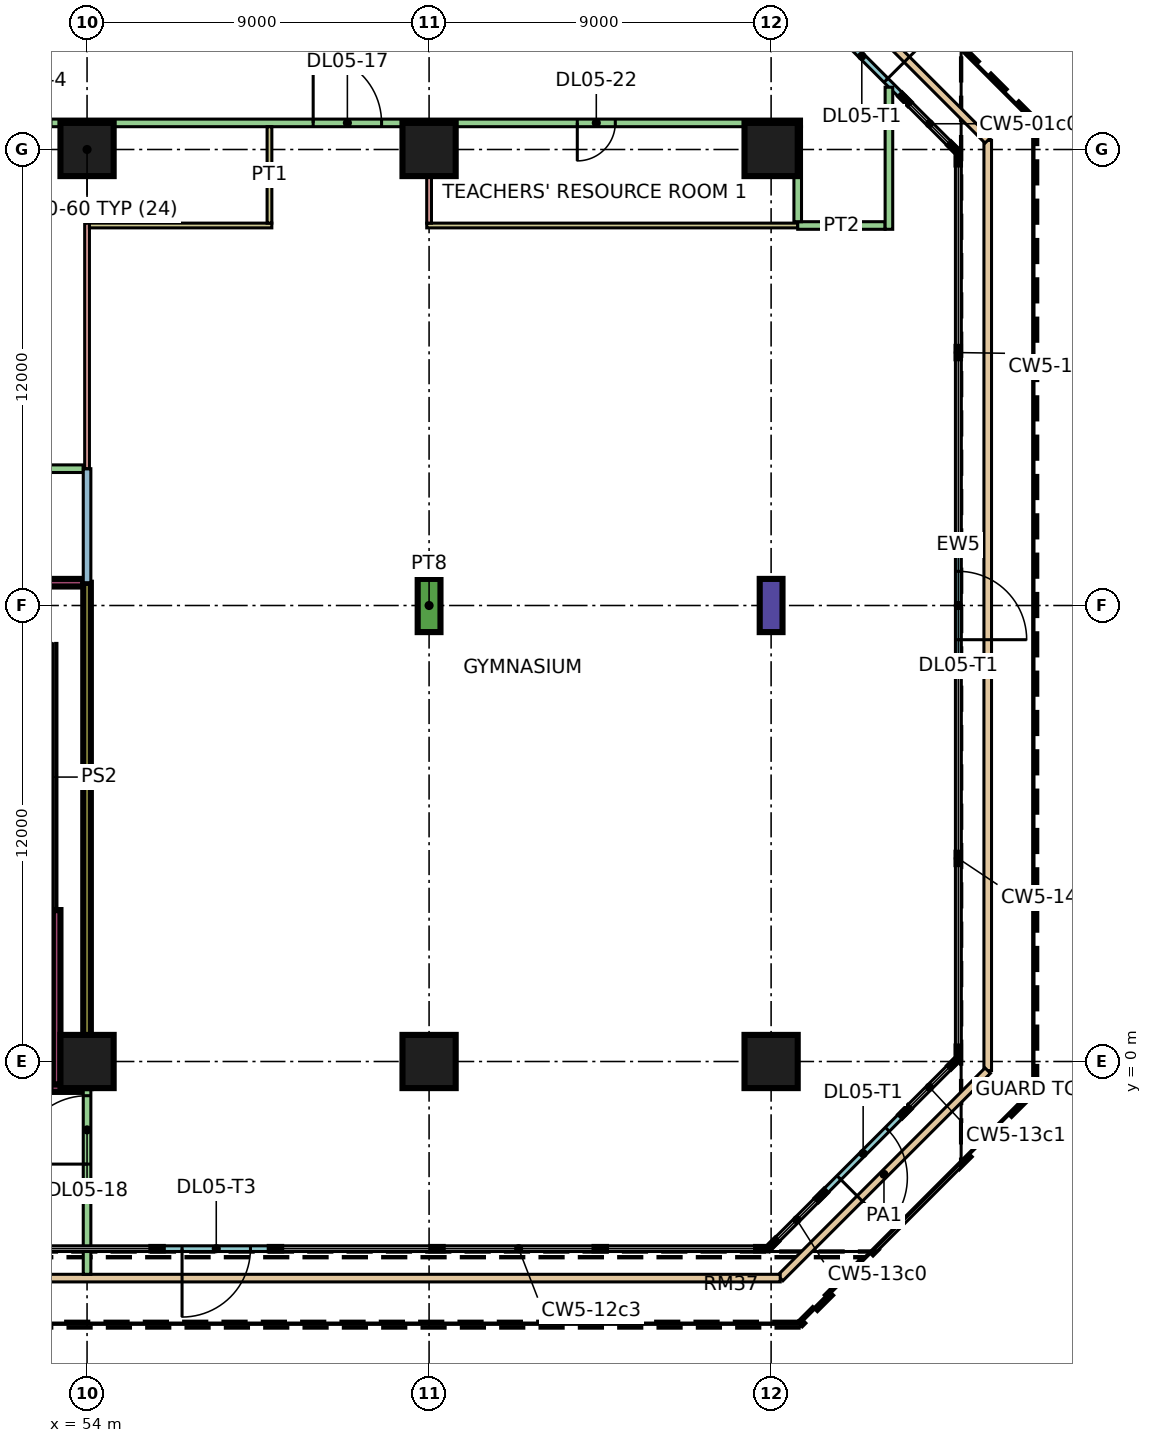
"""IFC4 building model, lengths in metres.
Left out: names, types, materials, properties, quantities, classifications, styles, units other than length and angle.
Written with IfcOpenShell. Run it as: python <this file> out.ifc"""

import sys

from ifc_helpers import new_model, si_unit, direction, frame, frame_2d, origin, origin_2d, place, context, subcontext, project, spatial, rectangle, extrude, element, fill, save


model = new_model("IFC4")
c1 = context("Model", 3, precision=1e-05, world=origin(), true_north=direction((0.0, 1.0)))
c2 = subcontext(c1, "Body", "Model", "MODEL_VIEW")
j1 = project(units=[si_unit("LENGTHUNIT", "METRE"), si_unit("PLANEANGLEUNIT", "RADIAN")], contexts=[c1])
p1 = place(None, origin())
s1 = spatial("IfcSite", under=j1, at=p1, CompositionType="ELEMENT")
p2 = place(p1, origin())
s2 = spatial("IfcBuilding", under=s1, at=p2, CompositionType="ELEMENT")
p3 = place(p2, frame((0.0, 0.0, 26.4)))
s3 = spatial("IfcBuildingStorey", under=s2, at=p3, CompositionType="ELEMENT", Elevation=26.4)
for number, where, z_axis, x_axis in (
    (1, (54.0, 0.0, 0.0), (0.0, 0.0, 1.0), (1.0, 0.0, 0.0)),
    (2, (63.0, 0.0, 0.0), (0.0, 0.0, 1.0), (1.0, 0.0, 0.0)),
    (3, (72.0, 0.0, 0.0), (0.0, 0.0, 1.0), (1.0, 0.0, 0.0)),
    (4, (54.0, 24.0, 0.0), (0.0, 0.0, 1.0), (1.0, 0.0, 0.0)),
    (5, (63.0, 24.0, 0.0), (0.0, 0.0, 1.0), (1.0, 0.0, 0.0)),
    (6, (72.0, 24.0, 0.0), (0.0, 0.0, 1.0), (1.0, 0.0, 0.0)),
):
    element("IfcColumn", number, at=place(p3, frame(where, z_axis=z_axis, x_axis=x_axis)), inside=s3, PredefinedType="COLUMN", context=c2, shape_type="SweptSolid", body=[
        extrude(rectangle(XDim=1.4, YDim=1.4, at=origin_2d()), origin(), (0.0, 0.0, 1.0), 9.0),
    ])
p4 = place(p3, frame((75.482, 25.361, 0.0), z_axis=(0.0, 0.0, 1.0), x_axis=(-0.707106781187, 0.707106781187, 0.0)))
e7 = element("IfcWall", 7, at=p4, inside=s3, PredefinedType="SOLIDWALL", context=c2, shape_type="SweptSolid", body=[
    extrude(rectangle(XDim=3.0, YDim=0.15, at=frame_2d((1.5, 0.0))), origin(), (0.0, 0.0, 1.0), 8.45),
])
p5 = place(p4, frame((0.65, 0.0, 0.0)))
e8 = element("IfcOpeningElement", 8, at=p5, cuts=e7, PredefinedType="OPENING", context=c2, shape_type="SweptSolid", body=[
    extrude(rectangle(XDim=1.8, YDim=2.4, at=frame_2d((0.9, 1.2))), frame((0.0, 0.085, 0.0), z_axis=(0.0, -1.0, 0.0), x_axis=(1.0, 0.0, 0.0)), (0.0, 0.0, 1.0), 0.17),
])
p6 = place(p3, frame((55.9, -4.925, 0.0), z_axis=(0.0, 0.0, 1.0), x_axis=(1.0, 0.0, 0.0)))
e9 = element("IfcWall", 9, at=p6, inside=s3, PredefinedType="SOLIDWALL", context=c2, shape_type="SweptSolid", body=[
    extrude(rectangle(XDim=3.0, YDim=0.15, at=frame_2d((1.5, 0.0))), origin(), (0.0, 0.0, 1.0), 8.45),
])
p7 = place(p6, frame((0.6, 0.0, 0.0)))
e10 = element("IfcOpeningElement", 10, at=p7, cuts=e9, PredefinedType="OPENING", context=c2, shape_type="SweptSolid", body=[
    extrude(rectangle(XDim=1.8, YDim=2.4, at=frame_2d((0.9, 1.2))), frame((0.0, 0.085, 0.0), z_axis=(0.0, -1.0, 0.0), x_axis=(1.0, 0.0, 0.0)), (0.0, 0.0, 1.0), 0.17),
])
p8 = place(p3, frame((73.361, -3.482, 0.0), z_axis=(0.0, 0.0, 1.0), x_axis=(0.707106781187, 0.707106781187, 0.0)))
e11 = element("IfcWall", 11, at=p8, inside=s3, PredefinedType="SOLIDWALL", context=c2, shape_type="SweptSolid", body=[
    extrude(rectangle(XDim=3.0, YDim=0.15, at=frame_2d((1.5, 0.0))), origin(), (0.0, 0.0, 1.0), 8.45),
])
p9 = place(p8, frame((0.6, 0.0, 0.0)))
e12 = element("IfcOpeningElement", 12, at=p9, cuts=e11, PredefinedType="OPENING", context=c2, shape_type="SweptSolid", body=[
    extrude(rectangle(XDim=1.8, YDim=2.4, at=frame_2d((0.9, 1.2))), frame((0.0, 0.085, 0.0), z_axis=(0.0, -1.0, 0.0), x_axis=(1.0, 0.0, 0.0)), (0.0, 0.0, 1.0), 0.17),
])
p10 = place(p3, frame((76.925, 10.5, 0.0), z_axis=(0.0, 0.0, 1.0), x_axis=(0.0, 1.0, 0.0)))
e13 = element("IfcWall", 13, at=p10, inside=s3, PredefinedType="SOLIDWALL", context=c2, shape_type="SweptSolid", body=[
    extrude(rectangle(XDim=3.0, YDim=0.15, at=frame_2d((1.5, 0.0))), origin(), (0.0, 0.0, 1.0), 8.45),
])
p11 = place(p10, frame((0.6, 0.0, 0.0)))
e14 = element("IfcOpeningElement", 14, at=p11, cuts=e13, PredefinedType="OPENING", context=c2, shape_type="SweptSolid", body=[
    extrude(rectangle(XDim=1.8, YDim=2.4, at=frame_2d((0.9, 1.2))), frame((0.0, 0.085, 0.0), z_axis=(0.0, -1.0, 0.0), x_axis=(1.0, 0.0, 0.0)), (0.0, 0.0, 1.0), 0.17),
])
p12 = place(p3, frame((77.7, 24.24, 0.0), z_axis=(0.0, 0.0, 1.0), x_axis=(0.0, -1.0, 0.0)))
e15 = element("IfcWall", 15, at=p12, inside=s3, PredefinedType="PARAPET", context=c2, shape_type="SweptSolid", body=[
    extrude(rectangle(XDim=24.479, YDim=0.2, at=frame_2d((12.24, 0.0))), origin(), (0.0, 0.0, 1.0), 0.5),
])
p13 = place(p3, frame((77.7, -0.24, 0.0), z_axis=(0.0, 0.0, 1.0), x_axis=(-0.707106781187, -0.707106781187, 0.0)))
e16 = element("IfcWall", 16, at=p13, inside=s3, PredefinedType="PARAPET", context=c2, shape_type="SweptSolid", body=[
    extrude(rectangle(XDim=7.722, YDim=0.2, at=frame_2d((3.861, 0.0))), origin(), (0.0, 0.0, 1.0), 0.5),
])
p14 = place(p3, frame((72.24, -5.7, 0.0), z_axis=(0.0, 0.0, 1.0), x_axis=(-1.0, 0.0, 0.0)))
e17 = element("IfcWall", 17, at=p14, inside=s3, PredefinedType="PARAPET", context=c2, shape_type="SweptSolid", body=[
    extrude(rectangle(XDim=61.479, YDim=0.2, at=frame_2d((30.74, 0.0))), origin(), (0.0, 0.0, 1.0), 0.5),
])
p15 = place(p3, frame((72.24, 29.7, 0.0), z_axis=(0.0, 0.0, 1.0), x_axis=(0.707106781187, -0.707106781187, 0.0)))
e18 = element("IfcWall", 18, at=p15, inside=s3, PredefinedType="PARAPET", context=c2, shape_type="SweptSolid", body=[
    extrude(rectangle(XDim=7.722, YDim=0.2, at=frame_2d((3.861, 0.0))), origin(), (0.0, 0.0, 1.0), 0.5),
])
p16 = place(p3, frame((45.0, 12.6, 0.0), z_axis=(0.0, 0.0, 1.0), x_axis=(1.0, 0.0, 0.0)))
e19 = element("IfcWall", 19, at=p16, inside=s3, PredefinedType="SOLIDWALL", context=c2, shape_type="SweptSolid", body=[
    extrude(rectangle(XDim=8.9, YDim=0.2, at=frame_2d((4.45, 0.0))), origin(), (0.0, 0.0, 1.0), 8.45),
])
p17 = place(p16, frame((5.75, 0.0, 0.0)))
e20 = element("IfcOpeningElement", 20, at=p17, cuts=e19, PredefinedType="OPENING", context=c2, shape_type="SweptSolid", body=[
    extrude(rectangle(XDim=1.2, YDim=2.1, at=frame_2d((0.6, 1.05))), frame((0.0, 0.11, 0.0), z_axis=(0.0, -1.0, 0.0), x_axis=(1.0, 0.0, 0.0)), (0.0, 0.0, 1.0), 0.22),
])
p18 = place(p16, frame((2.15, 0.0, 0.0)))
e21 = element("IfcOpeningElement", 21, at=p18, cuts=e19, PredefinedType="OPENING", context=c2, shape_type="SweptSolid", body=[
    extrude(rectangle(XDim=1.2, YDim=2.1, at=frame_2d((0.6, 1.05))), frame((0.0, 0.11, 0.0), z_axis=(0.0, -1.0, 0.0), x_axis=(1.0, 0.0, 0.0)), (0.0, 0.0, 1.0), 0.22),
])
p19 = place(p3, frame((47.3, 24.7, 0.0), z_axis=(0.0, 0.0, 1.0), x_axis=(1.0, 0.0, 0.0)))
e22 = element("IfcWall", 22, at=p19, inside=s3, PredefinedType="PARTITIONING", context=c2, shape_type="SweptSolid", body=[
    extrude(rectangle(XDim=25.5, YDim=0.2, at=frame_2d((12.75, 0.0))), origin(), (0.0, 0.0, 1.0), 8.45),
])
p20 = place(p19, frame((4.75, 0.0, 0.0)))
e23 = element("IfcOpeningElement", 23, at=p20, cuts=e22, PredefinedType="OPENING", context=c2, shape_type="SweptSolid", body=[
    extrude(rectangle(XDim=1.0, YDim=2.1, at=frame_2d((0.5, 1.05))), frame((0.0, 0.11, 0.0), z_axis=(0.0, -1.0, 0.0), x_axis=(1.0, 0.0, 0.0)), (0.0, 0.0, 1.0), 0.22),
])
p21 = place(p19, frame((12.65, 0.0, 0.0)))
e24 = element("IfcOpeningElement", 24, at=p21, cuts=e22, PredefinedType="OPENING", context=c2, shape_type="SweptSolid", body=[
    extrude(rectangle(XDim=1.8, YDim=2.1, at=frame_2d((0.9, 1.05))), frame((0.0, 0.11, 0.0), z_axis=(0.0, -1.0, 0.0), x_axis=(1.0, 0.0, 0.0)), (0.0, 0.0, 1.0), 0.22),
])
p22 = place(p19, frame((19.6, 0.0, 0.0)))
e25 = element("IfcOpeningElement", 25, at=p22, cuts=e22, PredefinedType="OPENING", context=c2, shape_type="SweptSolid", body=[
    extrude(rectangle(XDim=1.0, YDim=2.1, at=frame_2d((0.5, 1.05))), frame((0.0, 0.11, 0.0), z_axis=(0.0, -1.0, 0.0), x_axis=(1.0, 0.0, 0.0)), (0.0, 0.0, 1.0), 0.22),
])
p23 = place(p3, frame((47.7, -0.7, 0.0), z_axis=(0.0, 0.0, 1.0), x_axis=(1.0, 0.0, 0.0)))
e26 = element("IfcWall", 26, at=p23, inside=s3, PredefinedType="SOLIDWALL", context=c2, shape_type="SweptSolid", body=[
    extrude(rectangle(XDim=6.2, YDim=0.2, at=frame_2d((3.1, 0.0))), origin(), (0.0, 0.0, 1.0), 8.45),
])
p24 = place(p3, frame((51.225, 15.6, 0.0), z_axis=(0.0, 0.0, 1.0), x_axis=(1.0, 0.0, 0.0)))
e27 = element("IfcWall", 27, at=p24, inside=s3, PredefinedType="PARTITIONING", context=c2, shape_type="SweptSolid", body=[
    extrude(rectangle(XDim=2.675, YDim=0.2, at=frame_2d((1.337, 0.0))), origin(), (0.0, 0.0, 1.0), 8.45),
])
p25 = place(p3, frame((54.0, -5.6, 0.0), z_axis=(0.0, 0.0, 1.0), x_axis=(0.0, 1.0, 0.0)))
e28 = element("IfcWall", 28, at=p25, inside=s3, PredefinedType="PARTITIONING", context=c2, shape_type="SweptSolid", body=[
    extrude(rectangle(XDim=4.9, YDim=0.2, at=frame_2d((2.45, 0.0))), origin(), (0.0, 0.0, 1.0), 8.45),
])
p26 = place(p25, frame((2.9, 0.0, 0.0)))
e29 = element("IfcOpeningElement", 29, at=p26, cuts=e28, PredefinedType="OPENING", context=c2, shape_type="SweptSolid", body=[
    extrude(rectangle(XDim=1.8, YDim=2.1, at=frame_2d((0.9, 1.05))), frame((0.0, 0.11, 0.0), z_axis=(0.0, -1.0, 0.0), x_axis=(1.0, 0.0, 0.0)), (0.0, 0.0, 1.0), 0.22),
])
p27 = place(p3, frame((54.0, -0.7, 0.0), z_axis=(0.0, 0.0, 1.0), x_axis=(0.0, 1.0, 0.0)))
e30 = element("IfcWall", 30, at=p27, inside=s3, PredefinedType="SOLIDWALL", context=c2, shape_type="SweptSolid", body=[
    extrude(rectangle(XDim=13.3, YDim=0.2, at=frame_2d((6.65, 0.0))), origin(), (0.0, 0.0, 1.0), 6.55),
])
p28 = place(p3, frame((54.0, 12.6, 0.0), z_axis=(0.0, 0.0, 1.0), x_axis=(0.0, 1.0, 0.0)))
e31 = element("IfcWall", 31, at=p28, inside=s3, PredefinedType="PARTITIONING", context=c2, shape_type="SweptSolid", body=[
    extrude(rectangle(XDim=3.0, YDim=0.2, at=frame_2d((1.5, 0.0))), origin(), (0.0, 0.0, 1.0), 6.55),
])
p29 = place(p3, frame((54.0, 15.6, 0.0), z_axis=(0.0, 0.0, 1.0), x_axis=(0.0, 1.0, 0.0)))
e32 = element("IfcWall", 32, at=p29, inside=s3, PredefinedType="PARTITIONING", context=c2, shape_type="SweptSolid", body=[
    extrude(rectangle(XDim=6.462, YDim=0.125, at=frame_2d((3.231, 0.0))), origin(), (0.0, 0.0, 1.0), 6.55),
])
p30 = place(p3, frame((54.062, 22.0, 0.0), z_axis=(0.0, 0.0, 1.0), x_axis=(1.0, 0.0, 0.0)))
e33 = element("IfcWall", 33, at=p30, inside=s3, PredefinedType="PARTITIONING", context=c2, shape_type="SweptSolid", body=[
    extrude(rectangle(XDim=4.8, YDim=0.125, at=frame_2d((2.4, 0.0))), origin(), (0.0, 0.0, 1.0), 8.45),
])
p31 = place(p3, frame((58.8, 22.062, 0.0), z_axis=(0.0, 0.0, 1.0), x_axis=(0.0, 1.0, 0.0)))
e34 = element("IfcWall", 34, at=p31, inside=s3, PredefinedType="PARTITIONING", context=c2, shape_type="SweptSolid", body=[
    extrude(rectangle(XDim=2.538, YDim=0.125, at=frame_2d((1.269, 0.0))), origin(), (0.0, 0.0, 1.0), 8.45),
])
p32 = place(p3, frame((62.938, 22.0, 0.0), z_axis=(0.0, 0.0, 1.0), x_axis=(1.0, 0.0, 0.0)))
e35 = element("IfcWall", 35, at=p32, inside=s3, PredefinedType="PARTITIONING", context=c2, shape_type="SweptSolid", body=[
    extrude(rectangle(XDim=9.762, YDim=0.125, at=frame_2d((4.881, 0.0))), origin(), (0.0, 0.0, 1.0), 8.45),
])
p33 = place(p3, frame((63.0, 22.062, 0.0), z_axis=(0.0, 0.0, 1.0), x_axis=(0.0, 1.0, 0.0)))
e36 = element("IfcWall", 36, at=p33, inside=s3, PredefinedType="PARTITIONING", context=c2, shape_type="SweptSolid", body=[
    extrude(rectangle(XDim=2.538, YDim=0.125, at=frame_2d((1.269, 0.0))), origin(), (0.0, 0.0, 1.0), 6.55),
])
p34 = place(p3, frame((72.7, 22.0, 0.0), z_axis=(0.0, 0.0, 1.0), x_axis=(1.0, 0.0, 0.0)))
e37 = element("IfcWall", 37, at=p34, inside=s3, PredefinedType="PARTITIONING", context=c2, shape_type="SweptSolid", body=[
    extrude(rectangle(XDim=2.3, YDim=0.2, at=frame_2d((1.15, 0.0))), origin(), (0.0, 0.0, 1.0), 8.45),
])
p35 = place(p3, frame((72.7, 22.1, 0.0), z_axis=(0.0, 0.0, 1.0), x_axis=(0.0, 1.0, 0.0)))
e38 = element("IfcWall", 38, at=p35, inside=s3, PredefinedType="PARTITIONING", context=c2, shape_type="SweptSolid", body=[
    extrude(rectangle(XDim=2.5, YDim=0.2, at=frame_2d((1.25, 0.0))), origin(), (0.0, 0.0, 1.0), 8.45),
])
p36 = place(p3, frame((75.1, 21.9, 0.0), z_axis=(0.0, 0.0, 1.0), x_axis=(0.0, 1.0, 0.0)))
e39 = element("IfcWall", 39, at=p36, inside=s3, PredefinedType="PARTITIONING", context=c2, shape_type="SweptSolid", body=[
    extrude(rectangle(XDim=3.739, YDim=0.2, at=frame_2d((1.87, 0.0))), origin(), (0.0, 0.0, 1.0), 8.45),
])
p37 = place(p3, frame((63.0, 11.3, 0.0), z_axis=(0.0, 0.0, 1.0), x_axis=(0.0, 1.0, 0.0)))
e40 = element("IfcWall", 40, at=p37, inside=s3, PredefinedType="SOLIDWALL", context=c2, shape_type="SweptSolid", body=[
    extrude(rectangle(XDim=1.4, YDim=0.6, at=frame_2d((0.7, 0.0))), origin(), (0.0, 0.0, 1.0), 6.55),
])
p38 = place(p3, frame((72.0, 11.3, 0.0), z_axis=(0.0, 0.0, 1.0), x_axis=(0.0, 1.0, 0.0)))
e41 = element("IfcWall", 41, at=p38, inside=s3, PredefinedType="SOLIDWALL", context=c2, shape_type="SweptSolid", body=[
    extrude(rectangle(XDim=1.4, YDim=0.6, at=frame_2d((0.7, 0.0))), origin(), (0.0, 0.0, 1.0), 6.95),
])
p39 = place(p3, frame((53.2, -0.6, 0.0), z_axis=(0.0, 0.0, 1.0), x_axis=(0.0, 1.0, 0.0)))
e42 = element("IfcWall", 42, at=p39, inside=s3, PredefinedType="SOLIDWALL", context=c2, shape_type="SweptSolid", body=[
    extrude(rectangle(XDim=4.585, YDim=0.2, at=frame_2d((2.292, 0.0))), origin(), (0.0, 0.0, 1.0), 8.45),
])
p40 = place(p5, frame((1.8, 0.0, 0.0), z_axis=(0.0, 0.0, 1.0), x_axis=(-1.0, 0.0, 0.0)))
e43 = element("IfcDoor", 43, at=p40, inside=s3, OperationType="DOUBLE_DOOR_SINGLE_SWING", PredefinedType="DOOR", context=c2, shape_type="SweptSolid", body=[
    extrude(rectangle(XDim=1.8, YDim=2.4, at=frame_2d((0.9, 1.2))), frame((0.0, 0.025, 0.0), z_axis=(0.0, -1.0, 0.0), x_axis=(1.0, 0.0, 0.0)), (0.0, 0.0, 1.0), 0.05),
])
fill(e8, e43)
p41 = place(p7, frame((1.8, 0.0, 0.0), z_axis=(0.0, 0.0, 1.0), x_axis=(-1.0, 0.0, 0.0)))
e44 = element("IfcDoor", 44, at=p41, inside=s3, OperationType="DOUBLE_DOOR_SINGLE_SWING", PredefinedType="DOOR", context=c2, shape_type="SweptSolid", body=[
    extrude(rectangle(XDim=1.8, YDim=2.4, at=frame_2d((0.9, 1.2))), frame((0.0, 0.025, 0.0), z_axis=(0.0, -1.0, 0.0), x_axis=(1.0, 0.0, 0.0)), (0.0, 0.0, 1.0), 0.05),
])
fill(e10, e44)
p42 = place(p9, frame((1.8, 0.0, 0.0), z_axis=(0.0, 0.0, 1.0), x_axis=(-1.0, 0.0, 0.0)))
e45 = element("IfcDoor", 45, at=p42, inside=s3, OperationType="DOUBLE_DOOR_SINGLE_SWING", PredefinedType="DOOR", context=c2, shape_type="SweptSolid", body=[
    extrude(rectangle(XDim=1.8, YDim=2.4, at=frame_2d((0.9, 1.2))), frame((0.0, 0.025, 0.0), z_axis=(0.0, -1.0, 0.0), x_axis=(1.0, 0.0, 0.0)), (0.0, 0.0, 1.0), 0.05),
])
fill(e12, e45)
p43 = place(p11, frame((1.8, 0.0, 0.0), z_axis=(0.0, 0.0, 1.0), x_axis=(-1.0, 0.0, 0.0)))
e46 = element("IfcDoor", 46, at=p43, inside=s3, OperationType="DOUBLE_DOOR_SINGLE_SWING", PredefinedType="DOOR", context=c2, shape_type="SweptSolid", body=[
    extrude(rectangle(XDim=1.8, YDim=2.4, at=frame_2d((0.9, 1.2))), frame((0.0, 0.025, 0.0), z_axis=(0.0, -1.0, 0.0), x_axis=(1.0, 0.0, 0.0)), (0.0, 0.0, 1.0), 0.05),
])
fill(e14, e46)
p44 = place(p21, origin())
e47 = element("IfcDoor", 47, at=p44, inside=s3, OperationType="DOUBLE_DOOR_SINGLE_SWING", PredefinedType="DOOR", context=c2, shape_type="SweptSolid", body=[
    extrude(rectangle(XDim=1.8, YDim=2.1, at=frame_2d((0.9, 1.05))), frame((0.0, 0.025, 0.0), z_axis=(0.0, -1.0, 0.0), x_axis=(1.0, 0.0, 0.0)), (0.0, 0.0, 1.0), 0.05),
])
fill(e24, e47)
p45 = place(p26, origin())
e48 = element("IfcDoor", 48, at=p45, inside=s3, OperationType="DOUBLE_DOOR_SINGLE_SWING", PredefinedType="DOOR", context=c2, shape_type="SweptSolid", body=[
    extrude(rectangle(XDim=1.8, YDim=2.1, at=frame_2d((0.9, 1.05))), frame((0.0, 0.025, 0.0), z_axis=(0.0, -1.0, 0.0), x_axis=(1.0, 0.0, 0.0)), (0.0, 0.0, 1.0), 0.05),
])
fill(e29, e48)
p46 = place(p22, frame((1.0, 0.0, 0.0), z_axis=(0.0, 0.0, 1.0), x_axis=(-1.0, 0.0, 0.0)))
e49 = element("IfcDoor", 49, at=p46, inside=s3, OperationType="SINGLE_SWING_LEFT", PredefinedType="DOOR", context=c2, shape_type="SweptSolid", body=[
    extrude(rectangle(XDim=1.0, YDim=2.1, at=frame_2d((0.5, 1.05))), frame((0.0, 0.025, 0.0), z_axis=(0.0, -1.0, 0.0), x_axis=(1.0, 0.0, 0.0)), (0.0, 0.0, 1.0), 0.05),
])
fill(e25, e49)
save(model, sys.argv[1])
